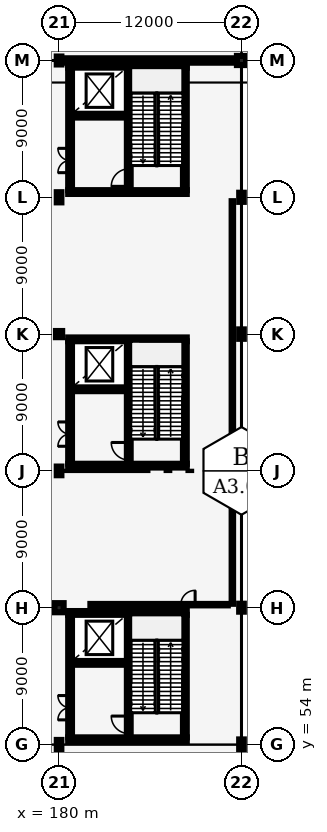
"""IFC4 building model, lengths in metres.
Left out: names, types, materials, properties, quantities, classifications, styles, units other than length and angle.
Written with IfcOpenShell. Run it as: python <this file> out.ifc"""

import sys

from ifc_helpers import new_model, si_unit, direction, frame, frame_2d, origin, origin_2d, place, context, subcontext, project, spatial, rectangle, hollow_circle, i_section, extrude, element, fill, save


model = new_model("IFC4")
c1 = context("Model", 3, precision=1e-05, world=origin(), true_north=direction((0.0, 1.0)))
c2 = subcontext(c1, "Body", "Model", "MODEL_VIEW")
j1 = project(units=[si_unit("LENGTHUNIT", "METRE"), si_unit("PLANEANGLEUNIT", "RADIAN")], contexts=[c1])
p1 = place(None, origin())
s1 = spatial("IfcSite", under=j1, at=p1, CompositionType="ELEMENT")
p2 = place(p1, origin())
s2 = spatial("IfcBuilding", under=s1, at=p2, CompositionType="ELEMENT")
p3 = place(p2, frame((0.0, 0.0, 12.0)))
s3 = spatial("IfcBuildingStorey", under=s2, at=p3, CompositionType="ELEMENT", Elevation=12.0)
p4 = place(p3, frame((180.0, 54.0, 0.0), z_axis=(0.0, 0.0, 1.0), x_axis=(1.0, 0.0, 0.0)))
e1 = element("IfcColumn", 1, at=p4, inside=s3, PredefinedType="COLUMN", context=c2, shape_type="SweptSolid", body=[
    extrude(i_section(OverallWidth=0.3, OverallDepth=0.6, WebThickness=0.015, FlangeThickness=0.03, FilletRadius=0.027, at=origin_2d()), origin(), (0.0, 0.0, 1.0), 6.0),
])
p5 = place(p3, frame((180.0, 63.0, 0.0), z_axis=(0.0, 0.0, 1.0), x_axis=(1.0, 0.0, 0.0)))
e2 = element("IfcColumn", 2, at=p5, inside=s3, PredefinedType="COLUMN", context=c2, shape_type="SweptSolid", body=[
    extrude(rectangle(XDim=0.6, YDim=0.6, at=origin_2d()), origin(), (0.0, 0.0, 1.0), 6.0),
])
p6 = place(p3, frame((180.0, 72.0, 0.0), z_axis=(0.0, 0.0, 1.0), x_axis=(1.0, 0.0, 0.0)))
e3 = element("IfcColumn", 3, at=p6, inside=s3, PredefinedType="COLUMN", context=c2, shape_type="SweptSolid", body=[
    extrude(i_section(OverallWidth=0.306, OverallDepth=0.572, WebThickness=0.021, FlangeThickness=0.04, FilletRadius=0.027, at=origin_2d()), origin(), (0.0, 0.0, 1.0), 6.0),
])
p7 = place(p3, frame((180.0, 81.0, 0.0), z_axis=(0.0, 0.0, 1.0), x_axis=(1.0, 0.0, 0.0)))
e4 = element("IfcColumn", 4, at=p7, inside=s3, PredefinedType="COLUMN", context=c2, shape_type="SweptSolid", body=[
    extrude(hollow_circle(Radius=0.203, WallThickness=0.016, at=origin_2d()), origin(), (0.0, 0.0, 1.0), 6.0),
])
p8 = place(p3, frame((180.0, 90.0, 0.0), z_axis=(0.0, 0.0, 1.0), x_axis=(1.0, 0.0, 0.0)))
e5 = element("IfcColumn", 5, at=p8, inside=s3, PredefinedType="COLUMN", context=c2, shape_type="SweptSolid", body=[
    extrude(i_section(OverallWidth=0.305, OverallDepth=0.668, WebThickness=0.021, FlangeThickness=0.04, FilletRadius=0.027, at=origin_2d()), origin(), (0.0, 0.0, 1.0), 6.0),
])
p9 = place(p3, frame((180.0, 99.0, 0.0), z_axis=(0.0, 0.0, 1.0), x_axis=(1.0, 0.0, 0.0)))
e6 = element("IfcColumn", 6, at=p9, inside=s3, PredefinedType="COLUMN", context=c2, shape_type="SweptSolid", body=[
    extrude(i_section(OverallWidth=0.306, OverallDepth=0.524, WebThickness=0.021, FlangeThickness=0.04, FilletRadius=0.027, at=origin_2d()), origin(), (0.0, 0.0, 1.0), 6.0),
])
p10 = place(p3, frame((192.0, 54.0, 0.0), z_axis=(0.0, 0.0, 1.0), x_axis=(1.0, 0.0, 0.0)))
e7 = element("IfcColumn", 7, at=p10, inside=s3, PredefinedType="COLUMN", context=c2, shape_type="SweptSolid", body=[
    extrude(i_section(OverallWidth=0.305, OverallDepth=0.668, WebThickness=0.021, FlangeThickness=0.04, FilletRadius=0.027, at=origin_2d()), origin(), (0.0, 0.0, 1.0), 6.0),
])
p11 = place(p3, frame((192.0, 63.0, 0.0), z_axis=(0.0, 0.0, 1.0), x_axis=(1.0, 0.0, 0.0)))
e8 = element("IfcColumn", 8, at=p11, inside=s3, PredefinedType="COLUMN", context=c2, shape_type="SweptSolid", body=[
    extrude(i_section(OverallWidth=0.306, OverallDepth=0.524, WebThickness=0.021, FlangeThickness=0.04, FilletRadius=0.027, at=origin_2d()), origin(), (0.0, 0.0, 1.0), 6.0),
])
p12 = place(p3, frame((192.0, 72.0, 0.0), z_axis=(0.0, 0.0, 1.0), x_axis=(1.0, 0.0, 0.0)))
e9 = element("IfcColumn", 9, at=p12, inside=s3, PredefinedType="COLUMN", context=c2, shape_type="SweptSolid", body=[
    extrude(rectangle(XDim=0.7, YDim=0.7, at=origin_2d()), origin(), (0.0, 0.0, 1.0), 6.0),
])
p13 = place(p3, frame((192.0, 81.0, 0.0), z_axis=(0.0, 0.0, 1.0), x_axis=(1.0, 0.0, 0.0)))
e10 = element("IfcColumn", 10, at=p13, inside=s3, PredefinedType="COLUMN", context=c2, shape_type="SweptSolid", body=[
    extrude(i_section(OverallWidth=0.305, OverallDepth=0.62, WebThickness=0.021, FlangeThickness=0.04, FilletRadius=0.027, at=origin_2d()), origin(), (0.0, 0.0, 1.0), 6.0),
])
p14 = place(p3, frame((192.0, 90.0, 0.0), z_axis=(0.0, 0.0, 1.0), x_axis=(1.0, 0.0, 0.0)))
e11 = element("IfcColumn", 11, at=p14, inside=s3, PredefinedType="COLUMN", context=c2, shape_type="SweptSolid", body=[
    extrude(i_section(OverallWidth=0.3, OverallDepth=0.6, WebThickness=0.015, FlangeThickness=0.03, FilletRadius=0.027, at=origin_2d()), origin(), (0.0, 0.0, 1.0), 6.0),
])
p15 = place(p3, frame((192.0, 99.0, 0.0), z_axis=(0.0, 0.0, 1.0), x_axis=(1.0, 0.0, 0.0)))
e12 = element("IfcColumn", 12, at=p15, inside=s3, PredefinedType="COLUMN", context=c2, shape_type="SweptSolid", body=[
    extrude(rectangle(XDim=0.6, YDim=0.6, at=origin_2d()), origin(), (0.0, 0.0, 1.0), 6.0),
])
p16 = place(p3, frame((180.148, 99.0, 0.0), z_axis=(0.0, 0.0, 1.0), x_axis=(1.0, 0.0, 0.0)))
e13 = element("IfcWall", 13, at=p16, inside=s3, PredefinedType="SOLIDWALL", context=c2, shape_type="SweptSolid", body=[
    extrude(rectangle(XDim=11.557, YDim=0.29, at=frame_2d((5.779, 0.0))), origin(), (0.0, 0.0, 1.0), 4.8),
])
p17 = place(p3, frame((180.725, 54.47, 0.0), z_axis=(0.0, 0.0, 1.0), x_axis=(0.0, 1.0, 0.0)))
e14 = element("IfcWall", 14, at=p17, inside=s3, PredefinedType="SHEAR", context=c2, shape_type="SweptSolid", body=[
    extrude(rectangle(XDim=8.06, YDim=0.25, at=frame_2d((4.03, 0.0))), origin(), (0.0, 0.0, 1.0), 5.64),
])
p18 = place(p17, frame((1.15, 0.0, 0.0)))
e15 = element("IfcOpeningElement", 15, at=p18, cuts=e14, PredefinedType="OPENING", context=c2, shape_type="SweptSolid", body=[
    extrude(rectangle(XDim=1.6, YDim=2.2, at=frame_2d((0.8, 1.1))), frame((0.0, 0.135, 0.0), z_axis=(0.0, -1.0, 0.0), x_axis=(1.0, 0.0, 0.0)), (0.0, 0.0, 1.0), 0.27),
])
p19 = place(p3, frame((188.275, 54.47, 0.0), z_axis=(0.0, 0.0, 1.0), x_axis=(0.0, 1.0, 0.0)))
e16 = element("IfcWall", 16, at=p19, inside=s3, PredefinedType="SHEAR", context=c2, shape_type="SweptSolid", body=[
    extrude(rectangle(XDim=8.06, YDim=0.25, at=frame_2d((4.03, 0.0))), origin(), (0.0, 0.0, 1.0), 5.64),
])
for number, where, z_axis, x_axis in (
    (17, (180.6, 54.345, 0.0), (0.0, 0.0, 1.0), (1.0, 0.0, 0.0)),
    (18, (180.6, 62.655, 0.0), (0.0, 0.0, 1.0), (1.0, 0.0, 0.0)),
):
    element("IfcWall", number, at=place(p3, frame(where, z_axis=z_axis, x_axis=x_axis)), inside=s3, PredefinedType="SHEAR", context=c2, shape_type="SweptSolid", body=[
        extrude(rectangle(XDim=7.8, YDim=0.25, at=frame_2d((3.9, 0.0))), origin(), (0.0, 0.0, 1.0), 5.64),
    ])
p20 = place(p3, frame((184.585, 54.47, 0.0), z_axis=(0.0, 0.0, 1.0), x_axis=(0.0, 1.0, 0.0)))
e19 = element("IfcWall", 19, at=p20, inside=s3, PredefinedType="SHEAR", context=c2, shape_type="SweptSolid", body=[
    extrude(rectangle(XDim=8.06, YDim=0.25, at=frame_2d((4.03, 0.0))), origin(), (0.0, 0.0, 1.0), 5.64),
])
p21 = place(p20, frame((0.25, 0.0, 0.0)))
e20 = element("IfcOpeningElement", 20, at=p21, cuts=e19, PredefinedType="OPENING", context=c2, shape_type="SweptSolid", body=[
    extrude(rectangle(XDim=1.15, YDim=2.15, at=frame_2d((0.575, 1.075))), frame((0.0, 0.135, 0.0), z_axis=(0.0, -1.0, 0.0), x_axis=(1.0, 0.0, 0.0)), (0.0, 0.0, 1.0), 0.27),
])
p22 = place(p3, frame((180.85, 59.37, 0.0), z_axis=(0.0, 0.0, 1.0), x_axis=(1.0, 0.0, 0.0)))
e21 = element("IfcWall", 21, at=p22, inside=s3, PredefinedType="SHEAR", context=c2, shape_type="SweptSolid", body=[
    extrude(rectangle(XDim=3.61, YDim=0.25, at=frame_2d((1.805, 0.0))), origin(), (0.0, 0.0, 1.0), 5.64),
])
p23 = place(p22, frame((0.95, 0.0, 0.0)))
e22 = element("IfcOpeningElement", 22, at=p23, cuts=e21, PredefinedType="OPENING", context=c2, shape_type="SweptSolid", body=[
    extrude(rectangle(XDim=1.2, YDim=2.2, at=frame_2d((0.6, 1.1))), frame((0.0, 0.135, 0.0), z_axis=(0.0, -1.0, 0.0), x_axis=(1.0, 0.0, 0.0)), (0.0, 0.0, 1.0), 0.27),
])
p24 = place(p3, frame((180.725, 72.47, 0.0), z_axis=(0.0, 0.0, 1.0), x_axis=(0.0, 1.0, 0.0)))
e23 = element("IfcWall", 23, at=p24, inside=s3, PredefinedType="SHEAR", context=c2, shape_type="SweptSolid", body=[
    extrude(rectangle(XDim=8.06, YDim=0.25, at=frame_2d((4.03, 0.0))), origin(), (0.0, 0.0, 1.0), 5.64),
])
p25 = place(p24, frame((1.15, 0.0, 0.0)))
e24 = element("IfcOpeningElement", 24, at=p25, cuts=e23, PredefinedType="OPENING", context=c2, shape_type="SweptSolid", body=[
    extrude(rectangle(XDim=1.6, YDim=2.2, at=frame_2d((0.8, 1.1))), frame((0.0, 0.135, 0.0), z_axis=(0.0, -1.0, 0.0), x_axis=(1.0, 0.0, 0.0)), (0.0, 0.0, 1.0), 0.27),
])
p26 = place(p3, frame((188.275, 72.47, 0.0), z_axis=(0.0, 0.0, 1.0), x_axis=(0.0, 1.0, 0.0)))
e25 = element("IfcWall", 25, at=p26, inside=s3, PredefinedType="SHEAR", context=c2, shape_type="SweptSolid", body=[
    extrude(rectangle(XDim=8.06, YDim=0.25, at=frame_2d((4.03, 0.0))), origin(), (0.0, 0.0, 1.0), 5.64),
])
for number, where, z_axis, x_axis in (
    (26, (180.6, 72.345, 0.0), (0.0, 0.0, 1.0), (1.0, 0.0, 0.0)),
    (27, (180.6, 80.655, 0.0), (0.0, 0.0, 1.0), (1.0, 0.0, 0.0)),
):
    element("IfcWall", number, at=place(p3, frame(where, z_axis=z_axis, x_axis=x_axis)), inside=s3, PredefinedType="SHEAR", context=c2, shape_type="SweptSolid", body=[
        extrude(rectangle(XDim=7.8, YDim=0.25, at=frame_2d((3.9, 0.0))), origin(), (0.0, 0.0, 1.0), 5.64),
    ])
p27 = place(p3, frame((184.585, 72.47, 0.0), z_axis=(0.0, 0.0, 1.0), x_axis=(0.0, 1.0, 0.0)))
e28 = element("IfcWall", 28, at=p27, inside=s3, PredefinedType="SHEAR", context=c2, shape_type="SweptSolid", body=[
    extrude(rectangle(XDim=8.06, YDim=0.25, at=frame_2d((4.03, 0.0))), origin(), (0.0, 0.0, 1.0), 5.64),
])
p28 = place(p27, frame((0.25, 0.0, 0.0)))
e29 = element("IfcOpeningElement", 29, at=p28, cuts=e28, PredefinedType="OPENING", context=c2, shape_type="SweptSolid", body=[
    extrude(rectangle(XDim=1.15, YDim=2.15, at=frame_2d((0.575, 1.075))), frame((0.0, 0.135, 0.0), z_axis=(0.0, -1.0, 0.0), x_axis=(1.0, 0.0, 0.0)), (0.0, 0.0, 1.0), 0.27),
])
p29 = place(p3, frame((180.85, 77.37, 0.0), z_axis=(0.0, 0.0, 1.0), x_axis=(1.0, 0.0, 0.0)))
e30 = element("IfcWall", 30, at=p29, inside=s3, PredefinedType="SHEAR", context=c2, shape_type="SweptSolid", body=[
    extrude(rectangle(XDim=3.61, YDim=0.25, at=frame_2d((1.805, 0.0))), origin(), (0.0, 0.0, 1.0), 5.64),
])
p30 = place(p29, frame((0.95, 0.0, 0.0)))
e31 = element("IfcOpeningElement", 31, at=p30, cuts=e30, PredefinedType="OPENING", context=c2, shape_type="SweptSolid", body=[
    extrude(rectangle(XDim=1.2, YDim=2.2, at=frame_2d((0.6, 1.1))), frame((0.0, 0.135, 0.0), z_axis=(0.0, -1.0, 0.0), x_axis=(1.0, 0.0, 0.0)), (0.0, 0.0, 1.0), 0.27),
])
p31 = place(p3, frame((180.725, 90.47, 0.0), z_axis=(0.0, 0.0, 1.0), x_axis=(0.0, 1.0, 0.0)))
e32 = element("IfcWall", 32, at=p31, inside=s3, PredefinedType="SHEAR", context=c2, shape_type="SweptSolid", body=[
    extrude(rectangle(XDim=8.06, YDim=0.25, at=frame_2d((4.03, 0.0))), origin(), (0.0, 0.0, 1.0), 5.64),
])
p32 = place(p31, frame((1.15, 0.0, 0.0)))
e33 = element("IfcOpeningElement", 33, at=p32, cuts=e32, PredefinedType="OPENING", context=c2, shape_type="SweptSolid", body=[
    extrude(rectangle(XDim=1.6, YDim=2.2, at=frame_2d((0.8, 1.1))), frame((0.0, 0.135, 0.0), z_axis=(0.0, -1.0, 0.0), x_axis=(1.0, 0.0, 0.0)), (0.0, 0.0, 1.0), 0.27),
])
p33 = place(p3, frame((188.275, 90.47, 0.0), z_axis=(0.0, 0.0, 1.0), x_axis=(0.0, 1.0, 0.0)))
e34 = element("IfcWall", 34, at=p33, inside=s3, PredefinedType="SHEAR", context=c2, shape_type="SweptSolid", body=[
    extrude(rectangle(XDim=8.06, YDim=0.25, at=frame_2d((4.03, 0.0))), origin(), (0.0, 0.0, 1.0), 5.64),
])
for number, where, z_axis, x_axis in (
    (35, (180.6, 90.345, 0.0), (0.0, 0.0, 1.0), (1.0, 0.0, 0.0)),
    (36, (180.6, 98.655, 0.0), (0.0, 0.0, 1.0), (1.0, 0.0, 0.0)),
):
    element("IfcWall", number, at=place(p3, frame(where, z_axis=z_axis, x_axis=x_axis)), inside=s3, PredefinedType="SHEAR", context=c2, shape_type="SweptSolid", body=[
        extrude(rectangle(XDim=7.8, YDim=0.25, at=frame_2d((3.9, 0.0))), origin(), (0.0, 0.0, 1.0), 5.64),
    ])
p34 = place(p3, frame((184.585, 90.47, 0.0), z_axis=(0.0, 0.0, 1.0), x_axis=(0.0, 1.0, 0.0)))
e37 = element("IfcWall", 37, at=p34, inside=s3, PredefinedType="SHEAR", context=c2, shape_type="SweptSolid", body=[
    extrude(rectangle(XDim=8.06, YDim=0.25, at=frame_2d((4.03, 0.0))), origin(), (0.0, 0.0, 1.0), 5.64),
])
p35 = place(p34, frame((0.25, 0.0, 0.0)))
e38 = element("IfcOpeningElement", 38, at=p35, cuts=e37, PredefinedType="OPENING", context=c2, shape_type="SweptSolid", body=[
    extrude(rectangle(XDim=1.15, YDim=2.15, at=frame_2d((0.575, 1.075))), frame((0.0, 0.135, 0.0), z_axis=(0.0, -1.0, 0.0), x_axis=(1.0, 0.0, 0.0)), (0.0, 0.0, 1.0), 0.27),
])
p36 = place(p3, frame((180.85, 95.37, 0.0), z_axis=(0.0, 0.0, 1.0), x_axis=(1.0, 0.0, 0.0)))
e39 = element("IfcWall", 39, at=p36, inside=s3, PredefinedType="SHEAR", context=c2, shape_type="SweptSolid", body=[
    extrude(rectangle(XDim=3.61, YDim=0.25, at=frame_2d((1.805, 0.0))), origin(), (0.0, 0.0, 1.0), 5.64),
])
p37 = place(p36, frame((0.95, 0.0, 0.0)))
e40 = element("IfcOpeningElement", 40, at=p37, cuts=e39, PredefinedType="OPENING", context=c2, shape_type="SweptSolid", body=[
    extrude(rectangle(XDim=1.2, YDim=2.2, at=frame_2d((0.6, 1.1))), frame((0.0, 0.135, 0.0), z_axis=(0.0, -1.0, 0.0), x_axis=(1.0, 0.0, 0.0)), (0.0, 0.0, 1.0), 0.27),
])
p38 = place(p3, frame((182.06, 63.2, 0.0), z_axis=(0.0, 0.0, 1.0), x_axis=(1.0, 0.0, 0.0)))
e41 = element("IfcWall", 41, at=p38, inside=s3, PredefinedType="PARTITIONING", context=c2, shape_type="SweptSolid", body=[
    extrude(rectangle(XDim=9.04, YDim=0.095, at=frame_2d((4.52, 0.0))), origin(), (0.0, 0.0, 1.0), 4.75),
])
p39 = place(p38, frame((5.95, 0.0, 0.0)))
e42 = element("IfcOpeningElement", 42, at=p39, cuts=e41, PredefinedType="OPENING", context=c2, shape_type="SweptSolid", body=[
    extrude(rectangle(XDim=0.94, YDim=2.1, at=frame_2d((0.47, 1.05))), frame((0.0, 0.057, 0.0), z_axis=(0.0, -1.0, 0.0), x_axis=(1.0, 0.0, 0.0)), (0.0, 0.0, 1.0), 0.115),
])
p40 = place(p3, frame((191.4, 63.257, 0.0), z_axis=(0.0, 0.0, 1.0), x_axis=(0.0, 1.0, 0.0)))
e43 = element("IfcWall", 43, at=p40, inside=s3, PredefinedType="PARTITIONING", context=c2, shape_type="SweptSolid", body=[
    extrude(rectangle(XDim=26.486, YDim=0.095, at=frame_2d((13.243, 0.0))), origin(), (0.0, 0.0, 1.0), 4.75),
])
p41 = place(p21, origin())
e44 = element("IfcDoor", 44, at=p41, inside=s3, OperationType="SINGLE_SWING_RIGHT", PredefinedType="DOOR", context=c2, shape_type="SweptSolid", body=[
    extrude(rectangle(XDim=1.15, YDim=2.15, at=frame_2d((0.575, 1.075))), frame((0.0, 0.025, 0.0), z_axis=(0.0, -1.0, 0.0), x_axis=(1.0, 0.0, 0.0)), (0.0, 0.0, 1.0), 0.05),
])
fill(e20, e44)
p42 = place(p23, origin())
e45 = element("IfcDoor", 45, at=p42, inside=s3, OperationType="DOUBLE_DOOR_SLIDING", PredefinedType="DOOR", context=c2, shape_type="SweptSolid", body=[
    extrude(rectangle(XDim=1.2, YDim=2.2, at=frame_2d((0.6, 1.1))), frame((0.0, 0.025, 0.0), z_axis=(0.0, -1.0, 0.0), x_axis=(1.0, 0.0, 0.0)), (0.0, 0.0, 1.0), 0.05),
])
fill(e22, e45)
p43 = place(p18, origin())
e46 = element("IfcDoor", 46, at=p43, inside=s3, OperationType="DOUBLE_DOOR_SINGLE_SWING", PredefinedType="DOOR", context=c2, shape_type="SweptSolid", body=[
    extrude(rectangle(XDim=1.6, YDim=2.2, at=frame_2d((0.8, 1.1))), frame((0.0, 0.025, 0.0), z_axis=(0.0, -1.0, 0.0), x_axis=(1.0, 0.0, 0.0)), (0.0, 0.0, 1.0), 0.05),
])
fill(e15, e46)
p44 = place(p28, origin())
e47 = element("IfcDoor", 47, at=p44, inside=s3, OperationType="SINGLE_SWING_RIGHT", PredefinedType="DOOR", context=c2, shape_type="SweptSolid", body=[
    extrude(rectangle(XDim=1.15, YDim=2.15, at=frame_2d((0.575, 1.075))), frame((0.0, 0.025, 0.0), z_axis=(0.0, -1.0, 0.0), x_axis=(1.0, 0.0, 0.0)), (0.0, 0.0, 1.0), 0.05),
])
fill(e29, e47)
p45 = place(p30, origin())
e48 = element("IfcDoor", 48, at=p45, inside=s3, OperationType="DOUBLE_DOOR_SLIDING", PredefinedType="DOOR", context=c2, shape_type="SweptSolid", body=[
    extrude(rectangle(XDim=1.2, YDim=2.2, at=frame_2d((0.6, 1.1))), frame((0.0, 0.025, 0.0), z_axis=(0.0, -1.0, 0.0), x_axis=(1.0, 0.0, 0.0)), (0.0, 0.0, 1.0), 0.05),
])
fill(e31, e48)
p46 = place(p25, origin())
e49 = element("IfcDoor", 49, at=p46, inside=s3, OperationType="DOUBLE_DOOR_SINGLE_SWING", PredefinedType="DOOR", context=c2, shape_type="SweptSolid", body=[
    extrude(rectangle(XDim=1.6, YDim=2.2, at=frame_2d((0.8, 1.1))), frame((0.0, 0.025, 0.0), z_axis=(0.0, -1.0, 0.0), x_axis=(1.0, 0.0, 0.0)), (0.0, 0.0, 1.0), 0.05),
])
fill(e24, e49)
p47 = place(p35, origin())
e50 = element("IfcDoor", 50, at=p47, inside=s3, OperationType="SINGLE_SWING_LEFT", PredefinedType="DOOR", context=c2, shape_type="SweptSolid", body=[
    extrude(rectangle(XDim=1.15, YDim=2.15, at=frame_2d((0.575, 1.075))), frame((0.0, 0.025, 0.0), z_axis=(0.0, -1.0, 0.0), x_axis=(1.0, 0.0, 0.0)), (0.0, 0.0, 1.0), 0.05),
])
fill(e38, e50)
p48 = place(p37, origin())
e51 = element("IfcDoor", 51, at=p48, inside=s3, OperationType="DOUBLE_DOOR_SLIDING", PredefinedType="DOOR", context=c2, shape_type="SweptSolid", body=[
    extrude(rectangle(XDim=1.2, YDim=2.2, at=frame_2d((0.6, 1.1))), frame((0.0, 0.025, 0.0), z_axis=(0.0, -1.0, 0.0), x_axis=(1.0, 0.0, 0.0)), (0.0, 0.0, 1.0), 0.05),
])
fill(e40, e51)
p49 = place(p32, origin())
e52 = element("IfcDoor", 52, at=p49, inside=s3, OperationType="DOUBLE_DOOR_SINGLE_SWING", PredefinedType="DOOR", context=c2, shape_type="SweptSolid", body=[
    extrude(rectangle(XDim=1.6, YDim=2.2, at=frame_2d((0.8, 1.1))), frame((0.0, 0.025, 0.0), z_axis=(0.0, -1.0, 0.0), x_axis=(1.0, 0.0, 0.0)), (0.0, 0.0, 1.0), 0.05),
])
fill(e33, e52)
p50 = place(p39, origin())
e53 = element("IfcDoor", 53, at=p50, inside=s3, OperationType="SINGLE_SWING_RIGHT", PredefinedType="DOOR", context=c2, shape_type="SweptSolid", body=[
    extrude(rectangle(XDim=0.94, YDim=2.1, at=frame_2d((0.47, 1.05))), frame((0.0, 0.025, 0.0), z_axis=(0.0, -1.0, 0.0), x_axis=(1.0, 0.0, 0.0)), (0.0, 0.0, 1.0), 0.05),
])
fill(e42, e53)
save(model, sys.argv[1])
